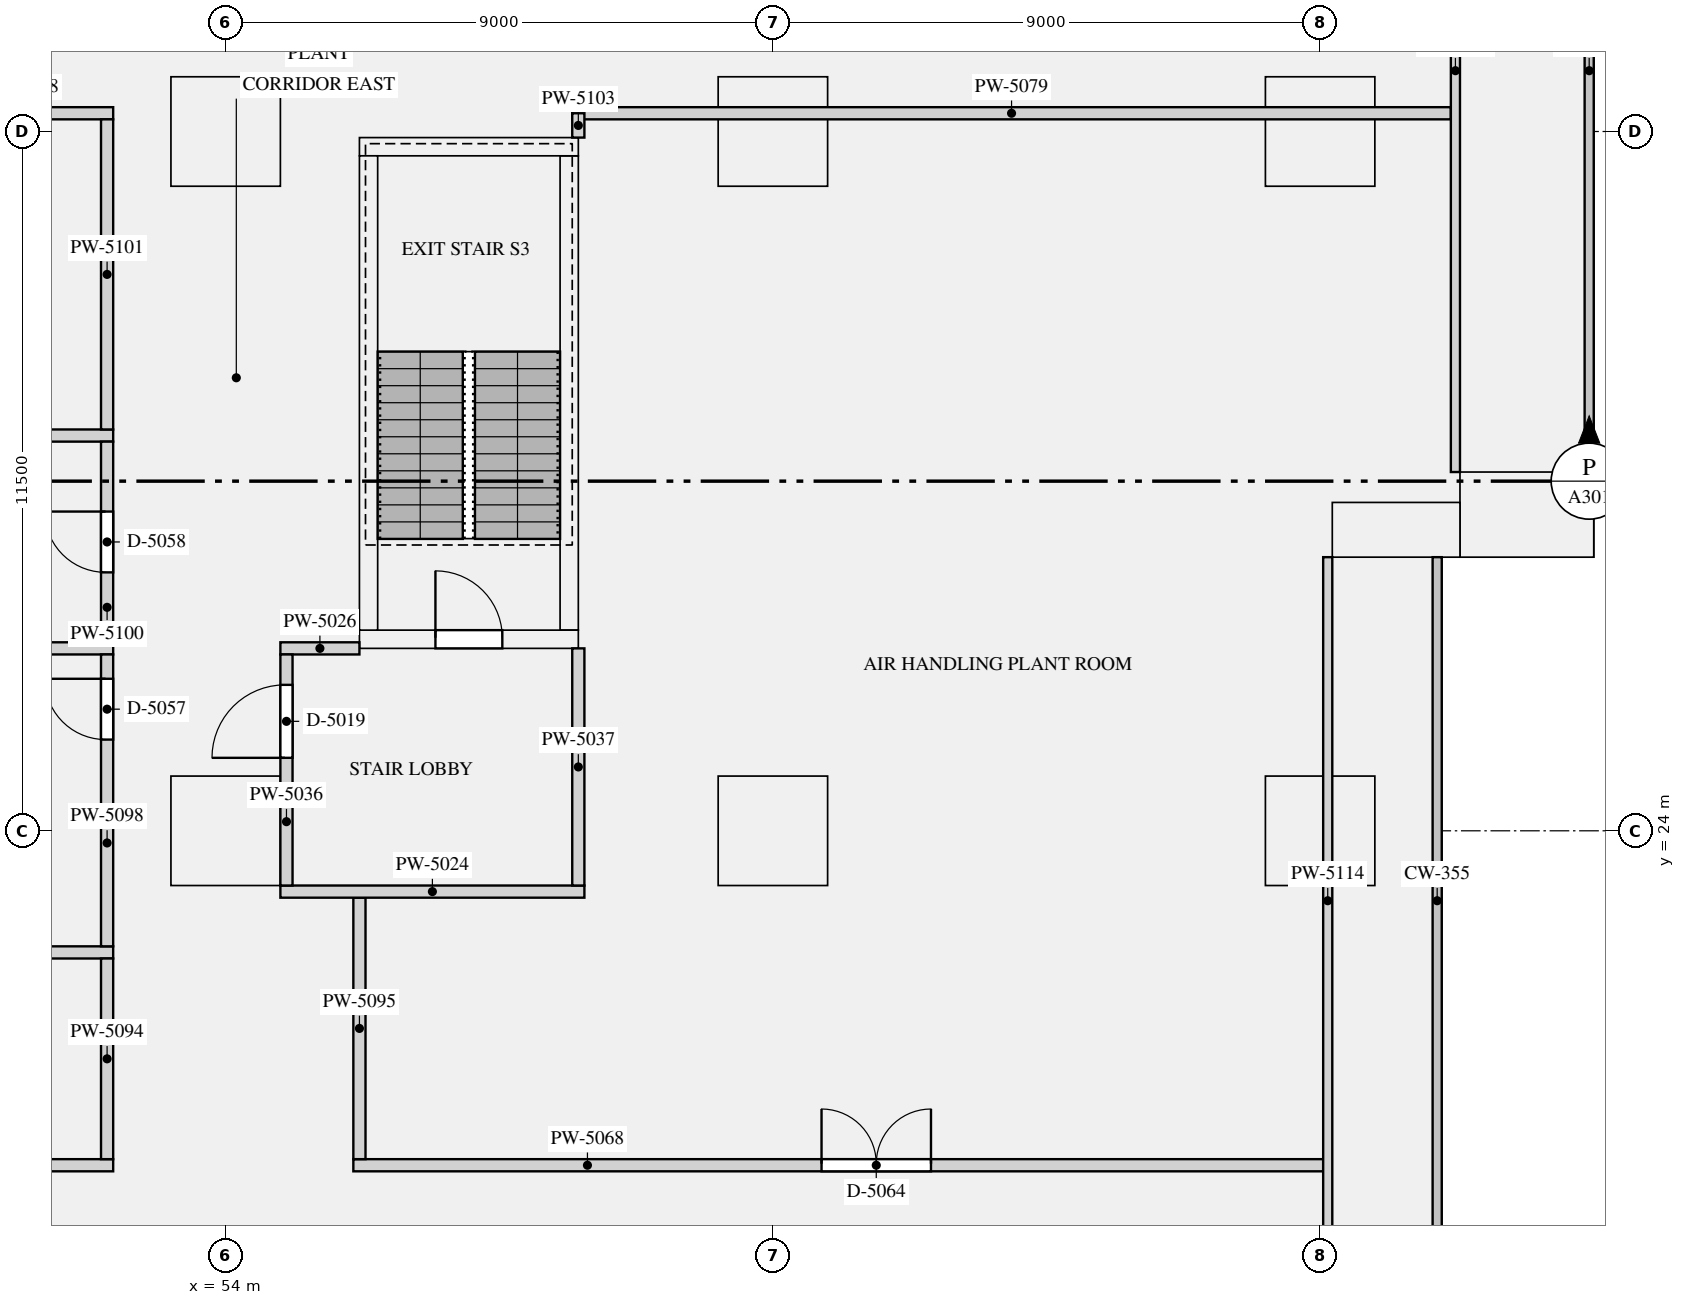
"""IFC4 building model, lengths in metres.
Left out: names, types, materials, properties, quantities, classifications, styles, units other than length and angle.
Written with IfcOpenShell. Run it as: python <this file> out.ifc"""

import sys

from ifc_helpers import new_model, si_unit, direction, frame, frame_2d, origin, origin_2d, place, context, subcontext, project, spatial, rectangle, extrude, element, fill, save


model = new_model("IFC4")
c1 = context("Model", 3, precision=1e-05, world=origin(), true_north=direction((0.0, 1.0)))
c2 = subcontext(c1, "Body", "Model", "MODEL_VIEW")
j1 = project(units=[si_unit("LENGTHUNIT", "METRE"), si_unit("PLANEANGLEUNIT", "RADIAN")], contexts=[c1])
p1 = place(None, origin())
s1 = spatial("IfcSite", under=j1, at=p1, CompositionType="ELEMENT")
p2 = place(p1, origin())
s2 = spatial("IfcBuilding", under=s1, at=p2, CompositionType="ELEMENT")
p3 = place(p2, frame((0.0, 0.0, 15.5)))
s3 = spatial("IfcBuildingStorey", under=s2, at=p3, CompositionType="ELEMENT", Elevation=15.5)
p4 = place(p3, frame((73.25, 28.95, 0.0), z_axis=(0.0, 0.0, 1.0), x_axis=(1.0, 0.0, 0.0)))
e1 = element("IfcColumn", 1, at=p4, inside=s3, PredefinedType="USERDEFINED", context=c2, shape_type="SweptSolid", body=[
    extrude(rectangle(XDim=2.1, YDim=0.9, at=origin_2d()), origin(), (0.0, 0.0, 1.0), 4.0),
])
p5 = place(p3, frame((75.4, 29.2, 0.0), z_axis=(0.0, 0.0, 1.0), x_axis=(0.0, 1.0, 0.0)))
e2 = element("IfcColumn", 2, at=p5, inside=s3, PredefinedType="USERDEFINED", context=c2, shape_type="SweptSolid", body=[
    extrude(rectangle(XDim=1.4, YDim=2.2, at=origin_2d()), origin(), (0.0, 0.0, 1.0), 4.0),
])
for number, where, z_axis, x_axis in (
    (3, (54.0, 24.0, 0.0), (0.0, 0.0, 1.0), (1.0, 0.0, 0.0)),
    (4, (54.0, 35.5, 0.0), (0.0, 0.0, 1.0), (1.0, 0.0, 0.0)),
    (5, (63.0, 24.0, 0.0), (0.0, 0.0, 1.0), (1.0, 0.0, 0.0)),
    (6, (63.0, 35.5, 0.0), (0.0, 0.0, 1.0), (1.0, 0.0, 0.0)),
    (7, (72.0, 24.0, 0.0), (0.0, 0.0, 1.0), (1.0, 0.0, 0.0)),
    (8, (72.0, 35.5, 0.0), (0.0, 0.0, 1.0), (1.0, 0.0, 0.0)),
):
    element("IfcColumn", number, at=place(p3, frame(where, z_axis=z_axis, x_axis=x_axis)), inside=s3, PredefinedType="COLUMN", context=c2, shape_type="SweptSolid", body=[
        extrude(rectangle(XDim=1.8, YDim=1.8, at=origin_2d()), origin(), (0.0, 0.0, 1.0), 4.0),
    ])
p6 = place(p3, frame((56.2, 27.15, 0.0), z_axis=(0.0, 0.0, 1.0), x_axis=(1.0, 0.0, 0.0)))
e9 = element("IfcWall", 9, at=p6, inside=s3, PredefinedType="SHEAR", context=c2, shape_type="SweptSolid", body=[
    extrude(rectangle(XDim=3.6, YDim=0.3, at=frame_2d((1.8, 0.0))), origin(), (0.0, 0.0, 1.0), 4.0),
])
p7 = place(p6, frame((1.25, 0.0, 0.0)))
e10 = element("IfcOpeningElement", 10, at=p7, cuts=e9, PredefinedType="OPENING", context=c2, shape_type="SweptSolid", body=[
    extrude(rectangle(XDim=1.1, YDim=2.1, at=frame_2d((0.55, 1.05))), frame((0.0, 0.16, 0.0), z_axis=(0.0, -1.0, 0.0), x_axis=(1.0, 0.0, 0.0)), (0.0, 0.0, 1.0), 0.32),
])
p8 = place(p3, frame((56.2, 35.25, 0.0), z_axis=(0.0, 0.0, 1.0), x_axis=(1.0, 0.0, 0.0)))
e11 = element("IfcWall", 11, at=p8, inside=s3, PredefinedType="SHEAR", context=c2, shape_type="SweptSolid", body=[
    extrude(rectangle(XDim=3.6, YDim=0.3, at=frame_2d((1.8, 0.0))), origin(), (0.0, 0.0, 1.0), 4.0),
])
for number, where, z_axis, x_axis in (
    (12, (56.35, 27.3, 0.0), (0.0, 0.0, 1.0), (0.0, 1.0, 0.0)),
    (13, (59.65, 27.3, 0.0), (0.0, 0.0, 1.0), (0.0, 1.0, 0.0)),
):
    element("IfcWall", number, at=place(p3, frame(where, z_axis=z_axis, x_axis=x_axis)), inside=s3, PredefinedType="SHEAR", context=c2, shape_type="SweptSolid", body=[
        extrude(rectangle(XDim=7.8, YDim=0.3, at=frame_2d((3.9, 0.0))), origin(), (0.0, 0.0, 1.0), 4.0),
    ])
p9 = place(p3, frame((54.9, 23.0, 0.0), z_axis=(0.0, 0.0, 1.0), x_axis=(1.0, 0.0, 0.0)))
e14 = element("IfcWall", 14, at=p9, inside=s3, PredefinedType="PARTITIONING", context=c2, shape_type="SweptSolid", body=[
    extrude(rectangle(XDim=5.0, YDim=0.2, at=frame_2d((2.5, 0.0))), origin(), (0.0, 0.0, 1.0), 3.68),
])
p10 = place(p3, frame((54.9, 27.0, 0.0), z_axis=(0.0, 0.0, 1.0), x_axis=(1.0, 0.0, 0.0)))
e15 = element("IfcWall", 15, at=p10, inside=s3, PredefinedType="PARTITIONING", context=c2, shape_type="SweptSolid", body=[
    extrude(rectangle(XDim=1.3, YDim=0.2, at=frame_2d((0.65, 0.0))), origin(), (0.0, 0.0, 1.0), 3.68),
])
p11 = place(p3, frame((55.0, 23.1, 0.0), z_axis=(0.0, 0.0, 1.0), x_axis=(0.0, 1.0, 0.0)))
e16 = element("IfcWall", 16, at=p11, inside=s3, PredefinedType="PARTITIONING", context=c2, shape_type="SweptSolid", body=[
    extrude(rectangle(XDim=3.8, YDim=0.2, at=frame_2d((1.9, 0.0))), origin(), (0.0, 0.0, 1.0), 3.68),
])
p12 = place(p11, frame((2.1, 0.0, 0.0)))
e17 = element("IfcOpeningElement", 17, at=p12, cuts=e16, PredefinedType="OPENING", context=c2, shape_type="SweptSolid", body=[
    extrude(rectangle(XDim=1.2, YDim=2.1, at=frame_2d((0.6, 1.05))), frame((0.0, 0.11, 0.0), z_axis=(0.0, -1.0, 0.0), x_axis=(1.0, 0.0, 0.0)), (0.0, 0.0, 1.0), 0.22),
])
p13 = place(p3, frame((59.8, 23.1, 0.0), z_axis=(0.0, 0.0, 1.0), x_axis=(0.0, 1.0, 0.0)))
e18 = element("IfcWall", 18, at=p13, inside=s3, PredefinedType="PARTITIONING", context=c2, shape_type="SweptSolid", body=[
    extrude(rectangle(XDim=3.9, YDim=0.2, at=frame_2d((1.95, 0.0))), origin(), (0.0, 0.0, 1.0), 3.68),
])
p14 = place(p3, frame((26.7, 18.5, 0.0), z_axis=(0.0, 0.0, 1.0), x_axis=(1.0, 0.0, 0.0)))
e19 = element("IfcWall", 19, at=p14, inside=s3, PredefinedType="PARTITIONING", context=c2, shape_type="SweptSolid", body=[
    extrude(rectangle(XDim=25.45, YDim=0.2, at=frame_2d((12.725, 0.0))), origin(), (0.0, 0.0, 1.0), 3.68),
])
p15 = place(p14, frame((21.425, 0.0, 0.0)))
e20 = element("IfcOpeningElement", 20, at=p15, cuts=e19, PredefinedType="OPENING", context=c2, shape_type="SweptSolid", body=[
    extrude(rectangle(XDim=1.0, YDim=2.1, at=frame_2d((0.5, 1.05))), frame((0.0, 0.11, 0.0), z_axis=(0.0, -1.0, 0.0), x_axis=(1.0, 0.0, 0.0)), (0.0, 0.0, 1.0), 0.22),
])
p16 = place(p14, frame((3.45, 0.0, 0.0)))
e21 = element("IfcOpeningElement", 21, at=p16, cuts=e19, PredefinedType="OPENING", context=c2, shape_type="SweptSolid", body=[
    extrude(rectangle(XDim=1.0, YDim=2.1, at=frame_2d((0.5, 1.05))), frame((0.0, 0.11, 0.0), z_axis=(0.0, -1.0, 0.0), x_axis=(1.0, 0.0, 0.0)), (0.0, 0.0, 1.0), 0.22),
])
p17 = place(p14, frame((10.05, 0.0, 0.0)))
e22 = element("IfcOpeningElement", 22, at=p17, cuts=e19, PredefinedType="OPENING", context=c2, shape_type="SweptSolid", body=[
    extrude(rectangle(XDim=1.0, YDim=2.1, at=frame_2d((0.5, 1.05))), frame((0.0, 0.11, 0.0), z_axis=(0.0, -1.0, 0.0), x_axis=(1.0, 0.0, 0.0)), (0.0, 0.0, 1.0), 0.22),
])
p18 = place(p14, frame((15.4, 0.0, 0.0)))
e23 = element("IfcOpeningElement", 23, at=p18, cuts=e19, PredefinedType="OPENING", context=c2, shape_type="SweptSolid", body=[
    extrude(rectangle(XDim=1.0, YDim=2.1, at=frame_2d((0.5, 1.05))), frame((0.0, 0.11, 0.0), z_axis=(0.0, -1.0, 0.0), x_axis=(1.0, 0.0, 0.0)), (0.0, 0.0, 1.0), 0.22),
])
p19 = place(p3, frame((56.1, 18.5, 0.0), z_axis=(0.0, 0.0, 1.0), x_axis=(1.0, 0.0, 0.0)))
e24 = element("IfcWall", 24, at=p19, inside=s3, PredefinedType="PARTITIONING", context=c2, shape_type="SweptSolid", body=[
    extrude(rectangle(XDim=15.95, YDim=0.2, at=frame_2d((7.975, 0.0))), origin(), (0.0, 0.0, 1.0), 3.68),
])
p20 = place(p19, frame((7.7, 0.0, 0.0)))
e25 = element("IfcOpeningElement", 25, at=p20, cuts=e24, PredefinedType="OPENING", context=c2, shape_type="SweptSolid", body=[
    extrude(rectangle(XDim=1.8, YDim=2.1, at=frame_2d((0.9, 1.05))), frame((0.0, 0.11, 0.0), z_axis=(0.0, -1.0, 0.0), x_axis=(1.0, 0.0, 0.0)), (0.0, 0.0, 1.0), 0.22),
])
p21 = place(p3, frame((45.1, 22.0, 0.0), z_axis=(0.0, 0.0, 1.0), x_axis=(1.0, 0.0, 0.0)))
e26 = element("IfcWall", 26, at=p21, inside=s3, PredefinedType="PARTITIONING", context=c2, shape_type="SweptSolid", body=[
    extrude(rectangle(XDim=7.05, YDim=0.2, at=frame_2d((3.525, 0.0))), origin(), (0.0, 0.0, 1.0), 3.68),
])
for number, where, z_axis, x_axis in (
    (27, (45.096, 27.0, 0.0), (0.0, 0.0, 1.0), (1.0, 0.0, 0.0)),
    (28, (45.096, 30.5, 0.0), (0.0, 0.0, 1.0), (1.0, 0.0, 0.0)),
):
    element("IfcWall", number, at=place(p3, frame(where, z_axis=z_axis, x_axis=x_axis)), inside=s3, PredefinedType="PARTITIONING", context=c2, shape_type="SweptSolid", body=[
        extrude(rectangle(XDim=7.054, YDim=0.2, at=frame_2d((3.527, 0.0))), origin(), (0.0, 0.0, 1.0), 3.68),
    ])
p22 = place(p3, frame((45.3, 35.8, 0.0), z_axis=(0.0, 0.0, 1.0), x_axis=(1.0, 0.0, 0.0)))
e29 = element("IfcWall", 29, at=p22, inside=s3, PredefinedType="PARTITIONING", context=c2, shape_type="SweptSolid", body=[
    extrude(rectangle(XDim=6.85, YDim=0.2, at=frame_2d((3.425, 0.0))), origin(), (0.0, 0.0, 1.0), 3.68),
])
p23 = place(p22, frame((2.875, 0.0, 0.0)))
e30 = element("IfcOpeningElement", 30, at=p23, cuts=e29, PredefinedType="OPENING", context=c2, shape_type="SweptSolid", body=[
    extrude(rectangle(XDim=1.0, YDim=2.1, at=frame_2d((0.5, 1.05))), frame((0.0, 0.11, 0.0), z_axis=(0.0, -1.0, 0.0), x_axis=(1.0, 0.0, 0.0)), (0.0, 0.0, 1.0), 0.22),
])
p24 = place(p3, frame((59.7, 35.8, 0.0), z_axis=(0.0, 0.0, 1.0), x_axis=(1.0, 0.0, 0.0)))
e31 = element("IfcWall", 31, at=p24, inside=s3, PredefinedType="PARTITIONING", context=c2, shape_type="SweptSolid", body=[
    extrude(rectangle(XDim=14.45, YDim=0.2, at=frame_2d((7.225, 0.0))), origin(), (0.0, 0.0, 1.0), 3.68),
])
p25 = place(p3, frame((52.05, 18.6, 0.0), z_axis=(0.0, 0.0, 1.0), x_axis=(0.0, 1.0, 0.0)))
e32 = element("IfcWall", 32, at=p25, inside=s3, PredefinedType="PARTITIONING", context=c2, shape_type="SweptSolid", body=[
    extrude(rectangle(XDim=3.3, YDim=0.2, at=frame_2d((1.65, 0.0))), origin(), (0.0, 0.0, 1.0), 3.68),
])
p26 = place(p3, frame((56.2, 18.6, 0.0), z_axis=(0.0, 0.0, 1.0), x_axis=(0.0, 1.0, 0.0)))
e33 = element("IfcWall", 33, at=p26, inside=s3, PredefinedType="PARTITIONING", context=c2, shape_type="SweptSolid", body=[
    extrude(rectangle(XDim=4.3, YDim=0.2, at=frame_2d((2.15, 0.0))), origin(), (0.0, 0.0, 1.0), 3.68),
])
p27 = place(p3, frame((52.05, 22.1, 0.0), z_axis=(0.0, 0.0, 1.0), x_axis=(0.0, 1.0, 0.0)))
e34 = element("IfcWall", 34, at=p27, inside=s3, PredefinedType="PARTITIONING", context=c2, shape_type="SweptSolid", body=[
    extrude(rectangle(XDim=4.8, YDim=0.2, at=frame_2d((2.4, 0.0))), origin(), (0.0, 0.0, 1.0), 3.68),
])
p28 = place(p27, frame((3.4, 0.0, 0.0)))
e35 = element("IfcOpeningElement", 35, at=p28, cuts=e34, PredefinedType="OPENING", context=c2, shape_type="SweptSolid", body=[
    extrude(rectangle(XDim=1.0, YDim=2.1, at=frame_2d((0.5, 1.05))), frame((0.0, 0.11, 0.0), z_axis=(0.0, -1.0, 0.0), x_axis=(1.0, 0.0, 0.0)), (0.0, 0.0, 1.0), 0.22),
])
p29 = place(p3, frame((52.05, 27.1, 0.0), z_axis=(0.0, 0.0, 1.0), x_axis=(0.0, 1.0, 0.0)))
e36 = element("IfcWall", 36, at=p29, inside=s3, PredefinedType="PARTITIONING", context=c2, shape_type="SweptSolid", body=[
    extrude(rectangle(XDim=3.3, YDim=0.2, at=frame_2d((1.65, 0.0))), origin(), (0.0, 0.0, 1.0), 3.68),
])
p30 = place(p29, frame((1.15, 0.0, 0.0)))
e37 = element("IfcOpeningElement", 37, at=p30, cuts=e36, PredefinedType="OPENING", context=c2, shape_type="SweptSolid", body=[
    extrude(rectangle(XDim=1.0, YDim=2.1, at=frame_2d((0.5, 1.05))), frame((0.0, 0.11, 0.0), z_axis=(0.0, -1.0, 0.0), x_axis=(1.0, 0.0, 0.0)), (0.0, 0.0, 1.0), 0.22),
])
p31 = place(p3, frame((52.05, 30.6, 0.0), z_axis=(0.0, 0.0, 1.0), x_axis=(0.0, 1.0, 0.0)))
e38 = element("IfcWall", 38, at=p31, inside=s3, PredefinedType="PARTITIONING", context=c2, shape_type="SweptSolid", body=[
    extrude(rectangle(XDim=5.1, YDim=0.2, at=frame_2d((2.55, 0.0))), origin(), (0.0, 0.0, 1.0), 3.68),
])
p32 = place(p3, frame((59.8, 35.4, 0.0), z_axis=(0.0, 0.0, 1.0), x_axis=(0.0, 1.0, 0.0)))
e39 = element("IfcWall", 39, at=p32, inside=s3, PredefinedType="PARTITIONING", context=c2, shape_type="SweptSolid", body=[
    extrude(rectangle(XDim=0.4, YDim=0.2, at=frame_2d((0.2, 0.0))), origin(), (0.0, 0.0, 1.0), 3.68),
])
p33 = place(p3, frame((72.125, 17.2, 0.0), z_axis=(0.0, 0.0, 1.0), x_axis=(0.0, 1.0, 0.0)))
e40 = element("IfcWall", 40, at=p33, inside=s3, PredefinedType="PARTITIONING", context=c2, shape_type="SweptSolid", body=[
    extrude(rectangle(XDim=11.3, YDim=0.15, at=frame_2d((5.65, 0.0))), origin(), (0.0, 0.0, 1.0), 3.68),
])
p34 = place(p3, frame((74.225, 29.9, 0.0), z_axis=(0.0, 0.0, 1.0), x_axis=(0.0, 1.0, 0.0)))
e41 = element("IfcWall", 41, at=p34, inside=s3, PredefinedType="PARTITIONING", context=c2, shape_type="SweptSolid", body=[
    extrude(rectangle(XDim=13.2, YDim=0.15, at=frame_2d((6.6, 0.0))), origin(), (0.0, 0.0, 1.0), 3.68),
])
p35 = place(p7, origin())
e42 = element("IfcDoor", 42, at=p35, inside=s3, OperationType="SINGLE_SWING_LEFT", PredefinedType="DOOR", context=c2, shape_type="SweptSolid", body=[
    extrude(rectangle(XDim=1.1, YDim=2.1, at=frame_2d((0.55, 1.05))), frame((0.0, 0.025, 0.0), z_axis=(0.0, -1.0, 0.0), x_axis=(1.0, 0.0, 0.0)), (0.0, 0.0, 1.0), 0.05),
])
fill(e10, e42)
p36 = place(p12, origin())
e43 = element("IfcDoor", 43, at=p36, inside=s3, OperationType="SINGLE_SWING_LEFT", PredefinedType="DOOR", context=c2, shape_type="SweptSolid", body=[
    extrude(rectangle(XDim=1.2, YDim=2.1, at=frame_2d((0.6, 1.05))), frame((0.0, 0.025, 0.0), z_axis=(0.0, -1.0, 0.0), x_axis=(1.0, 0.0, 0.0)), (0.0, 0.0, 1.0), 0.05),
])
fill(e17, e43)
p37 = place(p28, origin())
e44 = element("IfcDoor", 44, at=p37, inside=s3, OperationType="SINGLE_SWING_RIGHT", PredefinedType="DOOR", context=c2, shape_type="SweptSolid", body=[
    extrude(rectangle(XDim=1.0, YDim=2.1, at=frame_2d((0.5, 1.05))), frame((0.0, 0.025, 0.0), z_axis=(0.0, -1.0, 0.0), x_axis=(1.0, 0.0, 0.0)), (0.0, 0.0, 1.0), 0.05),
])
fill(e35, e44)
p38 = place(p30, origin())
e45 = element("IfcDoor", 45, at=p38, inside=s3, OperationType="SINGLE_SWING_RIGHT", PredefinedType="DOOR", context=c2, shape_type="SweptSolid", body=[
    extrude(rectangle(XDim=1.0, YDim=2.1, at=frame_2d((0.5, 1.05))), frame((0.0, 0.025, 0.0), z_axis=(0.0, -1.0, 0.0), x_axis=(1.0, 0.0, 0.0)), (0.0, 0.0, 1.0), 0.05),
])
fill(e37, e45)
p39 = place(p20, origin())
e46 = element("IfcDoor", 46, at=p39, inside=s3, OperationType="DOUBLE_DOOR_SINGLE_SWING", PredefinedType="DOOR", context=c2, shape_type="SweptSolid", body=[
    extrude(rectangle(XDim=1.8, YDim=2.1, at=frame_2d((0.9, 1.05))), frame((0.0, 0.025, 0.0), z_axis=(0.0, -1.0, 0.0), x_axis=(1.0, 0.0, 0.0)), (0.0, 0.0, 1.0), 0.05),
])
fill(e25, e46)
save(model, sys.argv[1])
